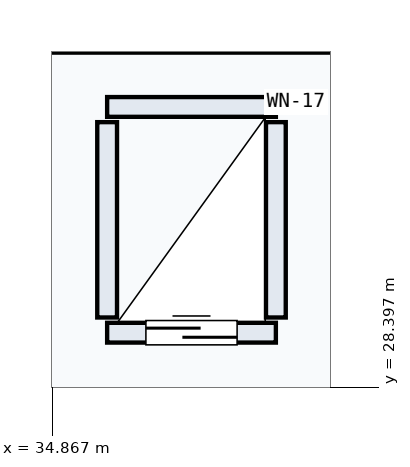
"""IFC4 building model, lengths in metres.
Left out: names, types, materials, properties, quantities, classifications, styles, units other than length and angle.
Written with IfcOpenShell. Run it as: python <this file> out.ifc"""

import sys

from ifc_helpers import new_model, si_unit, direction, frame, frame_2d, origin, place, context, subcontext, project, spatial, rectangle, extrude, element, fill, save


model = new_model("IFC4")
c1 = context("Model", 3, precision=1e-05, world=origin(), true_north=direction((0.0, 1.0)))
c2 = subcontext(c1, "Body", "Model", "MODEL_VIEW")
j1 = project(units=[si_unit("LENGTHUNIT", "METRE"), si_unit("PLANEANGLEUNIT", "RADIAN")], contexts=[c1])
p1 = place(None, origin())
s1 = spatial("IfcSite", under=j1, at=p1, CompositionType="ELEMENT")
p2 = place(p1, origin())
s2 = spatial("IfcBuilding", under=s1, at=p2, CompositionType="ELEMENT")
p3 = place(p2, frame((0.0, 0.0, 19.5)))
s3 = spatial("IfcBuildingStorey", under=s2, at=p3, CompositionType="ELEMENT", Elevation=19.5)
p4 = place(p3, frame((34.22, 33.0, 0.0), z_axis=(0.0, 0.0, 1.0), x_axis=(1.0, 0.0, 0.0)))
e1 = element("IfcWall", 1, at=p4, inside=s3, PredefinedType="SOLIDWALL", context=c2, shape_type="SweptSolid", body=[
    extrude(rectangle(XDim=11.56, YDim=0.4, at=frame_2d((5.78, 0.0))), origin(), (0.0, 0.0, 1.0), 3.77),
])
p5 = place(p4, frame((3.178, 0.0, 0.8)))
e2 = element("IfcOpeningElement", 2, at=p5, cuts=e1, PredefinedType="OPENING", context=c2, shape_type="SweptSolid", body=[
    extrude(rectangle(XDim=1.35, YDim=2.1, at=frame_2d((0.675, 1.05))), frame((0.0, 0.21, 0.0), z_axis=(0.0, -1.0, 0.0), x_axis=(1.0, 0.0, 0.0)), (0.0, 0.0, 1.0), 0.42),
])
p6 = place(p4, frame((7.032, 0.0, 0.8)))
e3 = element("IfcOpeningElement", 3, at=p6, cuts=e1, PredefinedType="OPENING", context=c2, shape_type="SweptSolid", body=[
    extrude(rectangle(XDim=1.35, YDim=2.1, at=frame_2d((0.675, 1.05))), frame((0.0, 0.21, 0.0), z_axis=(0.0, -1.0, 0.0), x_axis=(1.0, 0.0, 0.0)), (0.0, 0.0, 1.0), 0.42),
])
p7 = place(p3, frame((35.59, 29.115, 0.0), z_axis=(0.0, 0.0, 1.0), x_axis=(1.0, 0.0, 0.0)))
e4 = element("IfcWall", 4, at=p7, inside=s3, PredefinedType="SOLIDWALL", context=c2, shape_type="SweptSolid", body=[
    extrude(rectangle(XDim=2.22, YDim=0.26, at=frame_2d((1.11, 0.0))), origin(), (0.0, 0.0, 1.0), 4.46),
])
p8 = place(p7, frame((0.51, 0.0, 0.0)))
e5 = element("IfcOpeningElement", 5, at=p8, cuts=e4, PredefinedType="OPENING", context=c2, shape_type="SweptSolid", body=[
    extrude(rectangle(XDim=1.2, YDim=2.2, at=frame_2d((0.6, 1.1))), frame((0.0, 0.14, 0.0), z_axis=(0.0, -1.0, 0.0), x_axis=(1.0, 0.0, 0.0)), (0.0, 0.0, 1.0), 0.28),
])
p9 = place(p3, frame((35.59, 32.085, 0.0), z_axis=(0.0, 0.0, 1.0), x_axis=(1.0, 0.0, 0.0)))
e6 = element("IfcWall", 6, at=p9, inside=s3, PredefinedType="SOLIDWALL", context=c2, shape_type="SweptSolid", body=[
    extrude(rectangle(XDim=2.22, YDim=0.26, at=frame_2d((1.11, 0.0))), origin(), (0.0, 0.0, 1.0), 4.46),
])
for number, where, z_axis, x_axis in (
    (7, (35.59, 29.315, 0.0), (0.0, 0.0, 1.0), (0.0, 1.0, 0.0)),
    (8, (37.81, 29.315, 0.0), (0.0, 0.0, 1.0), (0.0, 1.0, 0.0)),
):
    element("IfcWall", number, at=place(p3, frame(where, z_axis=z_axis, x_axis=x_axis)), inside=s3, PredefinedType="SOLIDWALL", context=c2, shape_type="SweptSolid", body=[
        extrude(rectangle(XDim=2.57, YDim=0.26, at=frame_2d((1.285, 0.0))), origin(), (0.0, 0.0, 1.0), 4.46),
    ])
p10 = place(p8, origin())
e9 = element("IfcDoor", 9, at=p10, inside=s3, OperationType="SLIDING_TO_LEFT", PredefinedType="DOOR", context=c2, shape_type="SweptSolid", body=[
    extrude(rectangle(XDim=1.2, YDim=2.2, at=frame_2d((0.6, 1.1))), frame((0.0, 0.025, 0.0), z_axis=(0.0, -1.0, 0.0), x_axis=(1.0, 0.0, 0.0)), (0.0, 0.0, 1.0), 0.05),
])
fill(e5, e9)
save(model, sys.argv[1])
